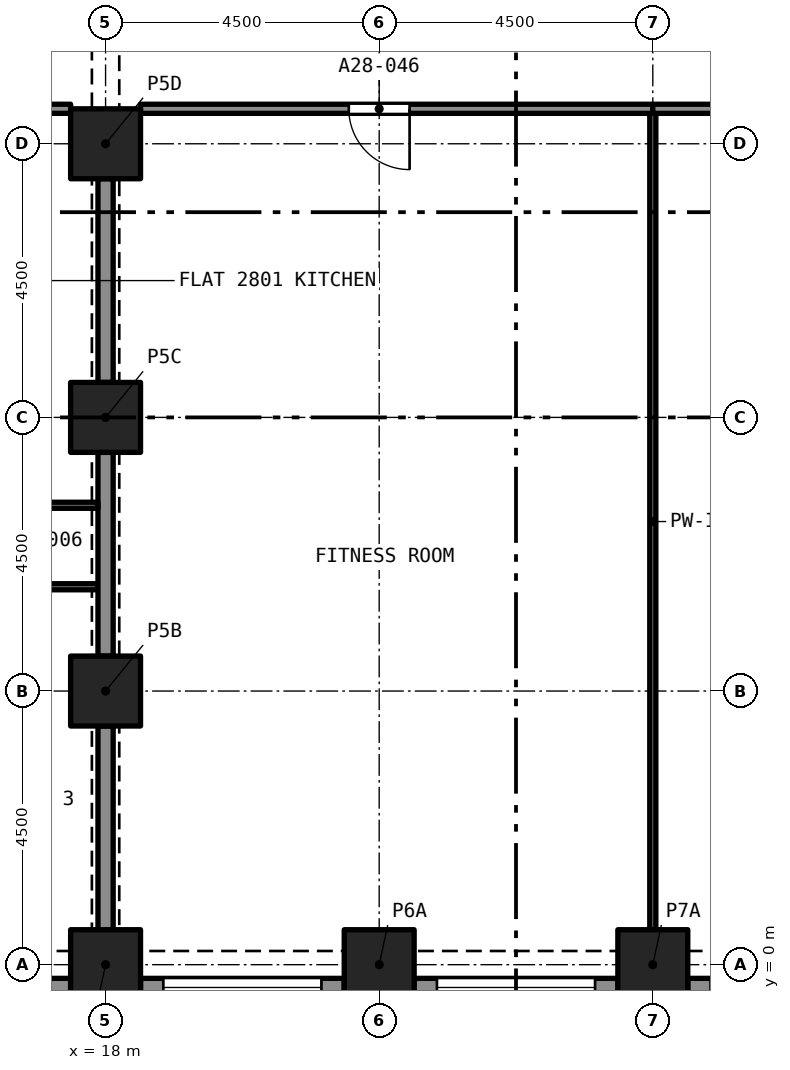
"""IFC4 building model, lengths in metres.
Left out: names, types, materials, properties, quantities, classifications, styles, units other than length and angle.
Written with IfcOpenShell. Run it as: python <this file> out.ifc"""

import sys

from ifc_helpers import new_model, si_unit, direction, frame, frame_2d, origin, origin_2d, place, context, subcontext, project, spatial, rectangle, extrude, element, fill, save


model = new_model("IFC4")
c1 = context("Model", 3, precision=1e-05, world=origin(), true_north=direction((0.0, 1.0)))
c2 = subcontext(c1, "Body", "Model", "MODEL_VIEW")
j1 = project(units=[si_unit("LENGTHUNIT", "METRE"), si_unit("PLANEANGLEUNIT", "RADIAN")], contexts=[c1])
p1 = place(None, origin())
s1 = spatial("IfcSite", under=j1, at=p1, CompositionType="ELEMENT")
p2 = place(p1, origin())
s2 = spatial("IfcBuilding", under=s1, at=p2, CompositionType="ELEMENT")
p3 = place(p2, frame((0.0, 0.0, 102.4)))
s3 = spatial("IfcBuildingStorey", under=s2, at=p3, CompositionType="ELEMENT", Elevation=102.4)
for number, where, z_axis, x_axis in (
    (1, (18.0, 0.0, 0.0), (0.0, 0.0, 1.0), (1.0, 0.0, 0.0)),
    (2, (22.5, 0.0, 0.0), (0.0, 0.0, 1.0), (1.0, 0.0, 0.0)),
    (3, (27.0, 0.0, 0.0), (0.0, 0.0, 1.0), (1.0, 0.0, 0.0)),
    (4, (18.0, 4.5, 0.0), (0.0, 0.0, 1.0), (1.0, 0.0, 0.0)),
    (5, (18.0, 9.0, 0.0), (0.0, 0.0, 1.0), (1.0, 0.0, 0.0)),
    (6, (18.0, 13.5, 0.0), (0.0, 0.0, 1.0), (1.0, 0.0, 0.0)),
):
    element("IfcColumn", number, at=place(p3, frame(where, z_axis=z_axis, x_axis=x_axis)), inside=s3, PredefinedType="COLUMN", context=c2, shape_type="SweptSolid", body=[
        extrude(rectangle(XDim=1.15, YDim=1.15, at=origin_2d()), origin(), (0.0, 0.0, 1.0), 3.2),
    ])
p4 = place(p3, frame((17.425, -0.375, 0.0), z_axis=(0.0, 0.0, 1.0), x_axis=(-1.0, 0.0, 0.0)))
e7 = element("IfcWall", 7, at=p4, inside=s3, PredefinedType="SOLIDWALL", context=c2, shape_type="SweptSolid", body=[
    extrude(rectangle(XDim=3.35, YDim=0.3, at=frame_2d((1.675, 0.0))), origin(), (0.0, 0.0, 1.0), 3.2),
])
p5 = place(p4, frame((0.375, 0.0, 0.45)))
e8 = element("IfcOpeningElement", 8, at=p5, cuts=e7, PredefinedType="OPENING", context=c2, shape_type="SweptSolid", body=[
    extrude(rectangle(XDim=2.6, YDim=1.95, at=frame_2d((1.3, 0.975))), frame((0.0, 0.16, 0.0), z_axis=(0.0, -1.0, 0.0), x_axis=(1.0, 0.0, 0.0)), (0.0, 0.0, 1.0), 0.32),
])
p6 = place(p3, frame((21.925, -0.375, 0.0), z_axis=(0.0, 0.0, 1.0), x_axis=(-1.0, 0.0, 0.0)))
e9 = element("IfcWall", 9, at=p6, inside=s3, PredefinedType="SOLIDWALL", context=c2, shape_type="SweptSolid", body=[
    extrude(rectangle(XDim=3.35, YDim=0.3, at=frame_2d((1.675, 0.0))), origin(), (0.0, 0.0, 1.0), 3.2),
])
p7 = place(p6, frame((0.375, 0.0, 0.45)))
e10 = element("IfcOpeningElement", 10, at=p7, cuts=e9, PredefinedType="OPENING", context=c2, shape_type="SweptSolid", body=[
    extrude(rectangle(XDim=2.6, YDim=1.95, at=frame_2d((1.3, 0.975))), frame((0.0, 0.16, 0.0), z_axis=(0.0, -1.0, 0.0), x_axis=(1.0, 0.0, 0.0)), (0.0, 0.0, 1.0), 0.32),
])
p8 = place(p3, frame((26.425, -0.375, 0.0), z_axis=(0.0, 0.0, 1.0), x_axis=(-1.0, 0.0, 0.0)))
e11 = element("IfcWall", 11, at=p8, inside=s3, PredefinedType="SOLIDWALL", context=c2, shape_type="SweptSolid", body=[
    extrude(rectangle(XDim=3.35, YDim=0.3, at=frame_2d((1.675, 0.0))), origin(), (0.0, 0.0, 1.0), 3.2),
])
p9 = place(p8, frame((0.375, 0.0, 0.45)))
e12 = element("IfcOpeningElement", 12, at=p9, cuts=e11, PredefinedType="OPENING", context=c2, shape_type="SweptSolid", body=[
    extrude(rectangle(XDim=2.6, YDim=1.95, at=frame_2d((1.3, 0.975))), frame((0.0, 0.16, 0.0), z_axis=(0.0, -1.0, 0.0), x_axis=(1.0, 0.0, 0.0)), (0.0, 0.0, 1.0), 0.32),
])
p10 = place(p3, frame((30.925, -0.375, 0.0), z_axis=(0.0, 0.0, 1.0), x_axis=(-1.0, 0.0, 0.0)))
e13 = element("IfcWall", 13, at=p10, inside=s3, PredefinedType="SOLIDWALL", context=c2, shape_type="SweptSolid", body=[
    extrude(rectangle(XDim=3.35, YDim=0.3, at=frame_2d((1.675, 0.0))), origin(), (0.0, 0.0, 1.0), 3.2),
])
p11 = place(p10, frame((0.375, 0.0, 0.45)))
e14 = element("IfcOpeningElement", 14, at=p11, cuts=e13, PredefinedType="OPENING", context=c2, shape_type="SweptSolid", body=[
    extrude(rectangle(XDim=2.6, YDim=1.95, at=frame_2d((1.3, 0.975))), frame((0.0, 0.16, 0.0), z_axis=(0.0, -1.0, 0.0), x_axis=(1.0, 0.0, 0.0)), (0.0, 0.0, 1.0), 0.32),
])
p12 = place(p3, frame((17.875, 6.215, 0.0), z_axis=(0.0, 0.0, 1.0), x_axis=(-1.0, 0.0, 0.0)))
e15 = element("IfcWall", 15, at=p12, inside=s3, PredefinedType="PARTITIONING", context=c2, shape_type="SweptSolid", body=[
    extrude(rectangle(XDim=4.375, YDim=0.1, at=frame_2d((2.188, 0.0))), origin(), (0.0, 0.0, 1.0), 2.9),
])
p13 = place(p12, frame((1.675, 0.0, 0.0)))
e16 = element("IfcOpeningElement", 16, at=p13, cuts=e15, PredefinedType="OPENING", context=c2, shape_type="SweptSolid", body=[
    extrude(rectangle(XDim=0.9, YDim=2.1, at=frame_2d((0.45, 1.05))), frame((0.0, 0.06, 0.0), z_axis=(0.0, -1.0, 0.0), x_axis=(1.0, 0.0, 0.0)), (0.0, 0.0, 1.0), 0.12),
])
for number, where, z_axis, x_axis in (
    (17, (18.0, 5.075, 0.0), (0.0, 0.0, 1.0), (0.0, 1.0, 0.0)),
    (18, (18.0, 0.575, 0.0), (0.0, 0.0, 1.0), (0.0, 1.0, 0.0)),
):
    element("IfcWall", number, at=place(p3, frame(where, z_axis=z_axis, x_axis=x_axis)), inside=s3, PredefinedType="PARTITIONING", context=c2, shape_type="SweptSolid", body=[
        extrude(rectangle(XDim=3.35, YDim=0.25, at=frame_2d((1.675, 0.0))), origin(), (0.0, 0.0, 1.0), 2.38),
    ])
p14 = place(p3, frame((15.175, 7.555, 0.0), z_axis=(0.0, 0.0, 1.0), x_axis=(1.0, 0.0, 0.0)))
e19 = element("IfcWall", 19, at=p14, inside=s3, PredefinedType="PARTITIONING", context=c2, shape_type="SweptSolid", body=[
    extrude(rectangle(XDim=2.7, YDim=0.1, at=frame_2d((1.35, 0.0))), origin(), (0.0, 0.0, 1.0), 2.9),
])
p15 = place(p14, frame((0.988, 0.0, 0.0)))
e20 = element("IfcOpeningElement", 20, at=p15, cuts=e19, PredefinedType="OPENING", context=c2, shape_type="SweptSolid", body=[
    extrude(rectangle(XDim=0.9, YDim=2.1, at=frame_2d((0.45, 1.05))), frame((0.0, 0.06, 0.0), z_axis=(0.0, -1.0, 0.0), x_axis=(1.0, 0.0, 0.0)), (0.0, 0.0, 1.0), 0.12),
])
p16 = place(p3, frame((18.0, 9.575, 0.0), z_axis=(0.0, 0.0, 1.0), x_axis=(0.0, 1.0, 0.0)))
e21 = element("IfcWall", 21, at=p16, inside=s3, PredefinedType="PARTITIONING", context=c2, shape_type="SweptSolid", body=[
    extrude(rectangle(XDim=3.35, YDim=0.25, at=frame_2d((1.675, 0.0))), origin(), (0.0, 0.0, 1.0), 2.38),
])
p17 = place(p3, frame((15.225, 14.075, 0.0), z_axis=(0.0, 0.0, 1.0), x_axis=(1.0, 0.0, 0.0)))
e22 = element("IfcWall", 22, at=p17, inside=s3, PredefinedType="PARTITIONING", context=c2, shape_type="SweptSolid", body=[
    extrude(rectangle(XDim=2.2, YDim=0.15, at=frame_2d((1.1, 0.0))), origin(), (0.0, 0.0, 1.0), 2.9),
])
p18 = place(p3, frame((27.0, 0.575, 0.0), z_axis=(0.0, 0.0, 1.0), x_axis=(0.0, 1.0, 0.0)))
e23 = element("IfcWall", 23, at=p18, inside=s3, PredefinedType="PARTITIONING", context=c2, shape_type="SweptSolid", body=[
    extrude(rectangle(XDim=13.425, YDim=0.1, at=frame_2d((6.712, 0.0))), origin(), (0.0, 0.0, 1.0), 2.75),
])
p19 = place(p3, frame((27.0, 14.075, 0.0), z_axis=(0.0, 0.0, 1.0), x_axis=(-1.0, 0.0, 0.0)))
e24 = element("IfcWall", 24, at=p19, inside=s3, PredefinedType="PARTITIONING", context=c2, shape_type="SweptSolid", body=[
    extrude(rectangle(XDim=8.425, YDim=0.15, at=frame_2d((4.212, 0.0))), origin(), (0.0, 0.0, 1.0), 2.75),
])
p20 = place(p19, frame((4.0, 0.0, 0.0)))
e25 = element("IfcOpeningElement", 25, at=p20, cuts=e24, PredefinedType="OPENING", context=c2, shape_type="SweptSolid", body=[
    extrude(rectangle(XDim=1.0, YDim=2.1, at=frame_2d((0.5, 1.05))), frame((0.0, 0.085, 0.0), z_axis=(0.0, -1.0, 0.0), x_axis=(1.0, 0.0, 0.0)), (0.0, 0.0, 1.0), 0.17),
])
p21 = place(p3, frame((30.925, 14.075, 0.0), z_axis=(0.0, 0.0, 1.0), x_axis=(-1.0, 0.0, 0.0)))
e26 = element("IfcWall", 26, at=p21, inside=s3, PredefinedType="PARTITIONING", context=c2, shape_type="SweptSolid", body=[
    extrude(rectangle(XDim=3.925, YDim=0.15, at=frame_2d((1.962, 0.0))), origin(), (0.0, 0.0, 1.0), 2.75),
])
p22 = place(p21, frame((1.175, 0.0, 0.0)))
e27 = element("IfcOpeningElement", 27, at=p22, cuts=e26, PredefinedType="OPENING", context=c2, shape_type="SweptSolid", body=[
    extrude(rectangle(XDim=1.0, YDim=2.1, at=frame_2d((0.5, 1.05))), frame((0.0, 0.085, 0.0), z_axis=(0.0, -1.0, 0.0), x_axis=(1.0, 0.0, 0.0)), (0.0, 0.0, 1.0), 0.17),
])
p23 = place(p7, origin())
e28 = element("IfcWindow", 28, at=p23, inside=s3, PartitioningType="SINGLE_PANEL", PredefinedType="WINDOW", context=c2, shape_type="SweptSolid", body=[
    extrude(rectangle(XDim=2.6, YDim=1.95, at=frame_2d((1.3, 0.975))), frame((0.0, 0.03, 0.0), z_axis=(0.0, -1.0, 0.0), x_axis=(1.0, 0.0, 0.0)), (0.0, 0.0, 1.0), 0.06),
])
fill(e10, e28)
p24 = place(p9, origin())
e29 = element("IfcWindow", 29, at=p24, inside=s3, PartitioningType="SINGLE_PANEL", PredefinedType="WINDOW", context=c2, shape_type="SweptSolid", body=[
    extrude(rectangle(XDim=2.6, YDim=1.95, at=frame_2d((1.3, 0.975))), frame((0.0, 0.03, 0.0), z_axis=(0.0, -1.0, 0.0), x_axis=(1.0, 0.0, 0.0)), (0.0, 0.0, 1.0), 0.06),
])
fill(e12, e29)
p25 = place(p20, origin())
e30 = element("IfcDoor", 30, at=p25, inside=s3, OperationType="SINGLE_SWING_RIGHT", PredefinedType="DOOR", context=c2, shape_type="SweptSolid", body=[
    extrude(rectangle(XDim=1.0, YDim=2.1, at=frame_2d((0.5, 1.05))), frame((0.0, 0.025, 0.0), z_axis=(0.0, -1.0, 0.0), x_axis=(1.0, 0.0, 0.0)), (0.0, 0.0, 1.0), 0.05),
])
fill(e25, e30)
save(model, sys.argv[1])
